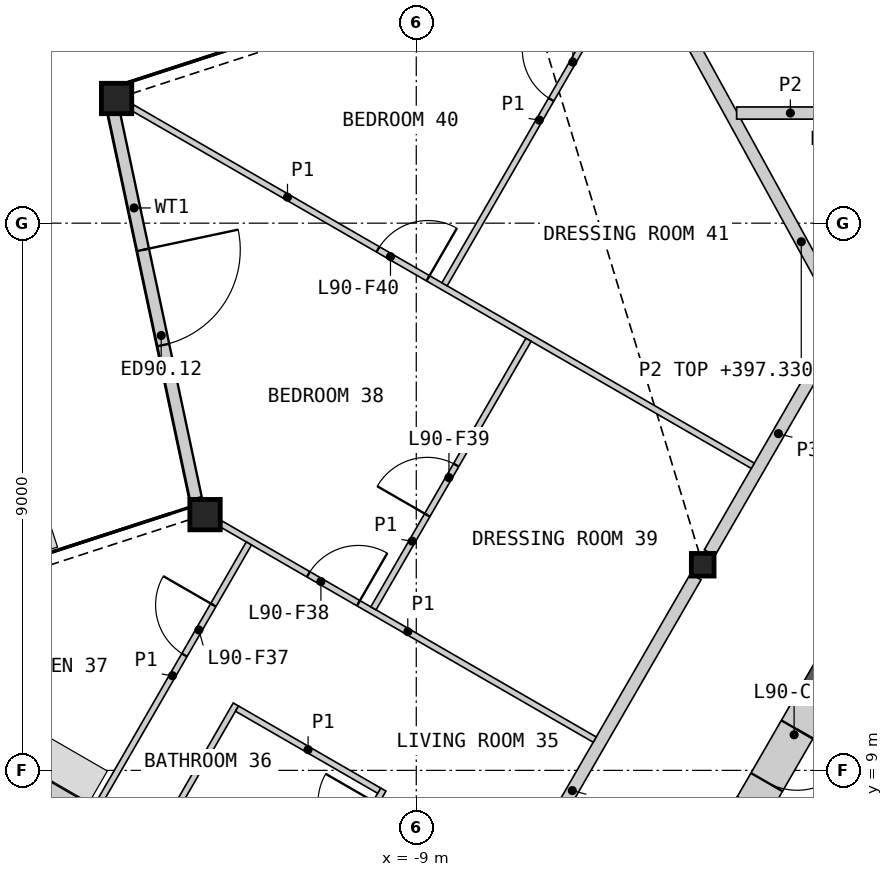
"""IFC4 building model, lengths in metres.
Left out: names, types, materials, properties, quantities, classifications, styles, units other than length and angle.
Written with IfcOpenShell. Run it as: python <this file> out.ifc"""

import sys

from ifc_helpers import new_model, si_unit, direction, frame, frame_2d, origin, origin_2d, place, context, subcontext, project, spatial, rectangle, hollow_rectangle, i_section, extrude, element, fill, save


model = new_model("IFC4")
c1 = context("Model", 3, precision=1e-05, world=origin(), true_north=direction((0.0, 1.0)))
c2 = subcontext(c1, "Body", "Model", "MODEL_VIEW")
j1 = project(units=[si_unit("LENGTHUNIT", "METRE"), si_unit("PLANEANGLEUNIT", "RADIAN")], contexts=[c1])
p1 = place(None, origin())
s1 = spatial("IfcSite", under=j1, at=p1, CompositionType="ELEMENT")
p2 = place(p1, origin())
s2 = spatial("IfcBuilding", under=s1, at=p2, CompositionType="ELEMENT")
p3 = place(p2, frame((0.0, 0.0, 395.0)))
s3 = spatial("IfcBuildingStorey", under=s2, at=p3, CompositionType="ELEMENT", Elevation=395.0)
for number, where, z_axis, x_axis in (
    (1, (-13.929, 20.051, 0.0), (0.0, 0.0, 1.0), (1.0, 0.0, 0.0)),
    (2, (-12.474, 13.206, 0.0), (0.0, 0.0, 1.0), (1.0, 0.0, 0.0)),
):
    element("IfcColumn", number, at=place(p3, frame(where, z_axis=z_axis, x_axis=x_axis)), inside=s3, PredefinedType="COLUMN", context=c2, shape_type="SweptSolid", body=[
        extrude(hollow_rectangle(XDim=0.5, YDim=0.5, WallThickness=0.03, at=origin_2d()), origin(), (0.0, 0.0, 1.0), 3.4),
    ])
p4 = place(p3, frame((-4.289, 12.382, 0.0), z_axis=(0.0, 0.0, 1.0), x_axis=(1.0, 0.0, 0.0)))
e3 = element("IfcColumn", 3, at=p4, inside=s3, PredefinedType="COLUMN", context=c2, shape_type="SweptSolid", body=[
    extrude(i_section(OverallWidth=0.374, OverallDepth=0.372, WebThickness=0.016, FlangeThickness=0.026, at=origin_2d()), origin(), (0.0, 0.0, 1.0), 3.4),
])
p5 = place(p3, frame((-13.979, 19.843, 0.0), z_axis=(0.0, 0.0, 1.0), x_axis=(0.207910765171, -0.978147797486, 0.0)))
e4 = element("IfcWall", 4, at=p5, inside=s3, PredefinedType="SOLIDWALL", context=c2, shape_type="SweptSolid", body=[
    extrude(rectangle(XDim=6.512, YDim=0.2, at=frame_2d((3.256, 0.0))), origin(), (0.0, 0.0, 1.0), 2.634),
])
p6 = place(p5, frame((2.333, 0.0, 0.0)))
e5 = element("IfcOpeningElement", 5, at=p6, cuts=e4, PredefinedType="OPENING", context=c2, shape_type="SweptSolid", body=[
    extrude(rectangle(XDim=1.6, YDim=2.25, at=frame_2d((0.8, 1.125))), frame((0.0, 0.11, 0.0), z_axis=(0.0, -1.0, 0.0), x_axis=(1.0, 0.0, 0.0)), (0.0, 0.0, 1.0), 0.22),
])
p7 = place(p3, frame((-3.461, 8.417, 0.0), z_axis=(0.0, 0.0, 1.0), x_axis=(-0.50000391502, -0.866023143435, 0.0)))
e6 = element("IfcWall", 6, at=p7, inside=s3, PredefinedType="SHEAR", context=c2, shape_type="SweptSolid", body=[
    extrude(rectangle(XDim=7.759, YDim=0.6, at=frame_2d((3.879, 0.0))), origin(), (0.0, 0.0, 1.0), 3.1),
])
p8 = place(p3, frame((-1.59, 11.658, 0.0), z_axis=(0.0, 0.0, 1.0), x_axis=(-0.500037594623, -0.866003697431, 0.0)))
e7 = element("IfcWall", 7, at=p8, inside=s3, PredefinedType="SHEAR", context=c2, shape_type="SweptSolid", body=[
    extrude(rectangle(XDim=1.542, YDim=0.6, at=frame_2d((0.771, 0.0))), origin(), (0.0, 0.0, 1.0), 3.1),
])
p9 = place(p3, frame((-2.361, 10.322, 0.0), z_axis=(0.0, 0.0, 1.0), x_axis=(-0.499946605688, -0.86605622881, 0.0)))
e8 = element("IfcWall", 8, at=p9, inside=s3, PredefinedType="SHEAR", context=c2, shape_type="SweptSolid", body=[
    extrude(rectangle(XDim=2.2, YDim=0.6, at=frame_2d((1.1, 0.0))), origin(), (0.0, 0.0, 1.0), 3.1),
])
p10 = place(p9, frame((0.75, 0.0, 0.0)))
e9 = element("IfcOpeningElement", 9, at=p10, cuts=e8, PredefinedType="OPENING", context=c2, shape_type="SweptSolid", body=[
    extrude(rectangle(XDim=1.0, YDim=2.1, at=frame_2d((0.5, 1.05))), frame((0.0, 0.31, 0.0), z_axis=(0.0, -1.0, 0.0), x_axis=(1.0, 0.0, 0.0)), (0.0, 0.0, 1.0), 0.62),
])
p11 = place(p3, frame((-8.465, 5.15, 0.0), z_axis=(0.0, 0.0, 1.0), x_axis=(0.499992155518, 0.866029932751, 0.0)))
e10 = element("IfcWall", 10, at=p11, inside=s3, PredefinedType="PARTITIONING", context=c2, shape_type="SweptSolid", body=[
    extrude(rectangle(XDim=8.123, YDim=0.2, at=frame_2d((4.062, 0.0))), origin(), (0.0, 0.0, 1.0), 3.1),
])
p12 = place(p11, frame((1.956, 0.0, 0.0)))
e11 = element("IfcOpeningElement", 11, at=p12, cuts=e10, PredefinedType="OPENING", context=c2, shape_type="SweptSolid", body=[
    extrude(rectangle(XDim=1.0, YDim=2.1, at=frame_2d((0.5, 1.05))), frame((0.0, 0.11, 0.0), z_axis=(0.0, -1.0, 0.0), x_axis=(1.0, 0.0, 0.0)), (0.0, 0.0, 1.0), 0.22),
])
p13 = place(p3, frame((-18.869, 10.894, 0.0), z_axis=(0.0, 0.0, 1.0), x_axis=(0.866023139795, -0.500003921324, 0.0)))
e12 = element("IfcWall", 12, at=p13, inside=s3, PredefinedType="PARTITIONING", context=c2, shape_type="SweptSolid", body=[
    extrude(rectangle(XDim=6.332, YDim=0.25, at=frame_2d((3.166, 0.0))), origin(), (0.0, 0.0, 1.0), 2.33),
])
p14 = place(p3, frame((-4.176, 12.579, 0.0), z_axis=(0.0, 0.0, 1.0), x_axis=(0.499974648164, 0.866040040179, 0.0)))
e13 = element("IfcWall", 13, at=p14, inside=s3, PredefinedType="PARTITIONING", context=c2, shape_type="SweptSolid", body=[
    extrude(rectangle(XDim=4.525, YDim=0.2, at=frame_2d((2.263, 0.0))), origin(), (0.0, 0.0, 1.0), 3.1),
])
p15 = place(p3, frame((-8.581, 28.455, 0.0), z_axis=(0.0, 0.0, 1.0), x_axis=(0.481551865547, -0.876417594979, 0.0)))
e14 = element("IfcWall", 14, at=p15, inside=s3, PredefinedType="PARTITIONING", context=c2, shape_type="SweptSolid", body=[
    extrude(rectangle(XDim=13.643, YDim=0.2, at=frame_2d((6.821, 0.0))), origin(), (0.0, 0.0, 1.0), 2.33),
])
p16 = place(p3, frame((-3.731, 19.811, 0.0), z_axis=(0.0, 0.0, 1.0), x_axis=(1.0, 0.0, 0.0)))
e15 = element("IfcWall", 15, at=p16, inside=s3, PredefinedType="PARTITIONING", context=c2, shape_type="SweptSolid", body=[
    extrude(rectangle(XDim=3.534, YDim=0.2, at=frame_2d((1.767, 0.0))), origin(), (0.0, 0.0, 1.0), 2.33),
])
p17 = place(p16, frame((1.396, 0.0, 0.0)))
e16 = element("IfcOpeningElement", 16, at=p17, cuts=e15, PredefinedType="OPENING", context=c2, shape_type="SweptSolid", body=[
    extrude(rectangle(XDim=0.95, YDim=2.1, at=frame_2d((0.475, 1.05))), frame((0.0, 0.11, 0.0), z_axis=(0.0, -1.0, 0.0), x_axis=(1.0, 0.0, 0.0)), (0.0, 0.0, 1.0), 0.22),
])
p18 = place(p3, frame((-13.669, 19.9, 0.0), z_axis=(0.0, 0.0, 1.0), x_axis=(0.866032376801, -0.499987922186, 0.0)))
e17 = element("IfcWall", 17, at=p18, inside=s3, PredefinedType="PARTITIONING", context=c2, shape_type="SweptSolid", body=[
    extrude(rectangle(XDim=11.782, YDim=0.1, at=frame_2d((5.891, 0.0))), origin(), (0.0, 0.0, 1.0), 2.33),
])
p19 = place(p18, frame((4.664, 0.0, 0.0)))
e18 = element("IfcOpeningElement", 18, at=p19, cuts=e17, PredefinedType="OPENING", context=c2, shape_type="SweptSolid", body=[
    extrude(rectangle(XDim=0.95, YDim=2.1, at=frame_2d((0.475, 1.05))), frame((0.0, 0.06, 0.0), z_axis=(0.0, -1.0, 0.0), x_axis=(1.0, 0.0, 0.0)), (0.0, 0.0, 1.0), 0.12),
])
p20 = place(p3, frame((-12.214, 13.056, 0.0), z_axis=(0.0, 0.0, 1.0), x_axis=(0.866018949465, -0.500011179042, 0.0)))
e19 = element("IfcWall", 19, at=p20, inside=s3, PredefinedType="PARTITIONING", context=c2, shape_type="SweptSolid", body=[
    extrude(rectangle(XDim=7.1, YDim=0.1, at=frame_2d((3.55, 0.0))), origin(), (0.0, 0.0, 1.0), 2.33),
])
p21 = place(p20, frame((1.663, 0.0, 0.0)))
e20 = element("IfcOpeningElement", 20, at=p21, cuts=e19, PredefinedType="OPENING", context=c2, shape_type="SweptSolid", body=[
    extrude(rectangle(XDim=0.95, YDim=2.1, at=frame_2d((0.475, 1.05))), frame((0.0, 0.06, 0.0), z_axis=(0.0, -1.0, 0.0), x_axis=(1.0, 0.0, 0.0)), (0.0, 0.0, 1.0), 0.12),
])
p22 = place(p3, frame((-8.535, 16.994, 0.0), z_axis=(0.0, 0.0, 1.0), x_axis=(0.499975529996, 0.866039531087, 0.0)))
e21 = element("IfcWall", 21, at=p22, inside=s3, PredefinedType="PARTITIONING", context=c2, shape_type="SweptSolid", body=[
    extrude(rectangle(XDim=6.235, YDim=0.1, at=frame_2d((3.118, 0.0))), origin(), (0.0, 0.0, 1.0), 2.33),
])
p23 = place(p22, frame((3.508, 0.0, 0.0)))
e22 = element("IfcOpeningElement", 22, at=p23, cuts=e21, PredefinedType="OPENING", context=c2, shape_type="SweptSolid", body=[
    extrude(rectangle(XDim=0.95, YDim=2.1, at=frame_2d((0.475, 1.05))), frame((0.0, 0.06, 0.0), z_axis=(0.0, -1.0, 0.0), x_axis=(1.0, 0.0, 0.0)), (0.0, 0.0, 1.0), 0.12),
])
p24 = place(p3, frame((-14.717, 5.321, 0.0), z_axis=(0.0, 0.0, 1.0), x_axis=(0.500015767406, 0.866016300277, 0.0)))
e23 = element("IfcWall", 23, at=p24, inside=s3, PredefinedType="PARTITIONING", context=c2, shape_type="SweptSolid", body=[
    extrude(rectangle(XDim=5.5, YDim=0.1, at=frame_2d((2.75, 0.0))), origin(), (0.0, 0.0, 1.0), 2.33),
])
p25 = place(p3, frame((-12.292, 3.921, 0.0), z_axis=(0.0, 0.0, 1.0), x_axis=(0.499996545922, 0.866027397988, 0.0)))
e24 = element("IfcWall", 24, at=p25, inside=s3, PredefinedType="PARTITIONING", context=c2, shape_type="SweptSolid", body=[
    extrude(rectangle(XDim=5.5, YDim=0.1, at=frame_2d((2.75, 0.0))), origin(), (0.0, 0.0, 1.0), 2.33),
])
p26 = place(p25, frame((4.3, 0.0, 0.0)))
e25 = element("IfcOpeningElement", 25, at=p26, cuts=e24, PredefinedType="OPENING", context=c2, shape_type="SweptSolid", body=[
    extrude(rectangle(XDim=0.95, YDim=2.1, at=frame_2d((0.475, 1.05))), frame((0.0, 0.06, 0.0), z_axis=(0.0, -1.0, 0.0), x_axis=(1.0, 0.0, 0.0)), (0.0, 0.0, 1.0), 0.12),
])
p27 = place(p25, frame((1.465, 0.0, 0.0)))
e26 = element("IfcOpeningElement", 26, at=p27, cuts=e24, PredefinedType="OPENING", context=c2, shape_type="SweptSolid", body=[
    extrude(rectangle(XDim=0.95, YDim=2.1, at=frame_2d((0.475, 1.05))), frame((0.0, 0.06, 0.0), z_axis=(0.0, -1.0, 0.0), x_axis=(1.0, 0.0, 0.0)), (0.0, 0.0, 1.0), 0.12),
])
p28 = place(p3, frame((-9.704, 11.665, 0.0), z_axis=(0.0, 0.0, 1.0), x_axis=(0.499984882974, 0.866034131428, 0.0)))
e27 = element("IfcWall", 27, at=p28, inside=s3, PredefinedType="PARTITIONING", context=c2, shape_type="SweptSolid", body=[
    extrude(rectangle(XDim=5.1, YDim=0.1, at=frame_2d((2.55, 0.0))), origin(), (0.0, 0.0, 1.0), 2.33),
])
p29 = place(p28, frame((1.771, 0.0, 0.0)))
e28 = element("IfcOpeningElement", 28, at=p29, cuts=e27, PredefinedType="OPENING", context=c2, shape_type="SweptSolid", body=[
    extrude(rectangle(XDim=0.95, YDim=2.1, at=frame_2d((0.475, 1.05))), frame((0.0, 0.06, 0.0), z_axis=(0.0, -1.0, 0.0), x_axis=(1.0, 0.0, 0.0)), (0.0, 0.0, 1.0), 0.12),
])
p30 = place(p3, frame((-14.265, 8.38, 0.0), z_axis=(0.0, 0.0, 1.0), x_axis=(0.500026652407, 0.866010015463, 0.0)))
e29 = element("IfcWall", 29, at=p30, inside=s3, PredefinedType="PARTITIONING", context=c2, shape_type="SweptSolid", body=[
    extrude(rectangle(XDim=5.025, YDim=0.1, at=frame_2d((2.513, 0.0))), origin(), (0.0, 0.0, 1.0), 2.33),
])
p31 = place(p30, frame((2.906, 0.0, 0.0)))
e30 = element("IfcOpeningElement", 30, at=p31, cuts=e29, PredefinedType="OPENING", context=c2, shape_type="SweptSolid", body=[
    extrude(rectangle(XDim=0.95, YDim=2.1, at=frame_2d((0.475, 1.05))), frame((0.0, 0.06, 0.0), z_axis=(0.0, -1.0, 0.0), x_axis=(1.0, 0.0, 0.0)), (0.0, 0.0, 1.0), 0.12),
])
p32 = place(p3, frame((-11.948, 10.016, 0.0), z_axis=(0.0, 0.0, 1.0), x_axis=(0.86599734893, -0.500048589285, 0.0)))
e31 = element("IfcWall", 31, at=p32, inside=s3, PredefinedType="PARTITIONING", context=c2, shape_type="SweptSolid", body=[
    extrude(rectangle(XDim=2.7, YDim=0.1, at=frame_2d((1.35, 0.0))), origin(), (0.0, 0.0, 1.0), 2.33),
])
p33 = place(p6, origin())
e32 = element("IfcDoor", 32, at=p33, inside=s3, OperationType="DOUBLE_DOOR_SINGLE_SWING", PredefinedType="DOOR", context=c2, shape_type="SweptSolid", body=[
    extrude(rectangle(XDim=1.6, YDim=2.25, at=frame_2d((0.8, 1.125))), frame((0.0, 0.025, 0.0), z_axis=(0.0, -1.0, 0.0), x_axis=(1.0, 0.0, 0.0)), (0.0, 0.0, 1.0), 0.05),
])
fill(e5, e32)
p34 = place(p10, origin())
e33 = element("IfcDoor", 33, at=p34, inside=s3, OperationType="SINGLE_SWING_LEFT", PredefinedType="DOOR", context=c2, shape_type="SweptSolid", body=[
    extrude(rectangle(XDim=1.0, YDim=2.1, at=frame_2d((0.5, 1.05))), frame((0.0, 0.055, 0.0), z_axis=(0.0, -1.0, 0.0), x_axis=(1.0, 0.0, 0.0)), (0.0, 0.0, 1.0), 0.05),
])
fill(e9, e33)
p35 = place(p31, origin())
e34 = element("IfcDoor", 34, at=p35, inside=s3, OperationType="SINGLE_SWING_RIGHT", PredefinedType="DOOR", context=c2, shape_type="SweptSolid", body=[
    extrude(rectangle(XDim=0.95, YDim=2.1, at=frame_2d((0.475, 1.05))), frame((0.0, 0.025, 0.0), z_axis=(0.0, -1.0, 0.0), x_axis=(1.0, 0.0, 0.0)), (0.0, 0.0, 1.0), 0.05),
])
fill(e30, e34)
p36 = place(p21, origin())
e35 = element("IfcDoor", 35, at=p36, inside=s3, OperationType="SINGLE_SWING_RIGHT", PredefinedType="DOOR", context=c2, shape_type="SweptSolid", body=[
    extrude(rectangle(XDim=0.95, YDim=2.1, at=frame_2d((0.475, 1.05))), frame((0.0, 0.025, 0.0), z_axis=(0.0, -1.0, 0.0), x_axis=(1.0, 0.0, 0.0)), (0.0, 0.0, 1.0), 0.05),
])
fill(e20, e35)
p37 = place(p29, origin())
e36 = element("IfcDoor", 36, at=p37, inside=s3, OperationType="SINGLE_SWING_LEFT", PredefinedType="DOOR", context=c2, shape_type="SweptSolid", body=[
    extrude(rectangle(XDim=0.95, YDim=2.1, at=frame_2d((0.475, 1.05))), frame((0.0, 0.025, 0.0), z_axis=(0.0, -1.0, 0.0), x_axis=(1.0, 0.0, 0.0)), (0.0, 0.0, 1.0), 0.05),
])
fill(e28, e36)
p38 = place(p19, origin())
e37 = element("IfcDoor", 37, at=p38, inside=s3, OperationType="SINGLE_SWING_RIGHT", PredefinedType="DOOR", context=c2, shape_type="SweptSolid", body=[
    extrude(rectangle(XDim=0.95, YDim=2.1, at=frame_2d((0.475, 1.05))), frame((0.0, 0.025, 0.0), z_axis=(0.0, -1.0, 0.0), x_axis=(1.0, 0.0, 0.0)), (0.0, 0.0, 1.0), 0.05),
])
fill(e18, e37)
p39 = place(p23, origin())
e38 = element("IfcDoor", 38, at=p39, inside=s3, OperationType="SINGLE_SWING_RIGHT", PredefinedType="DOOR", context=c2, shape_type="SweptSolid", body=[
    extrude(rectangle(XDim=0.95, YDim=2.1, at=frame_2d((0.475, 1.05))), frame((0.0, 0.025, 0.0), z_axis=(0.0, -1.0, 0.0), x_axis=(1.0, 0.0, 0.0)), (0.0, 0.0, 1.0), 0.05),
])
fill(e22, e38)
save(model, sys.argv[1])
